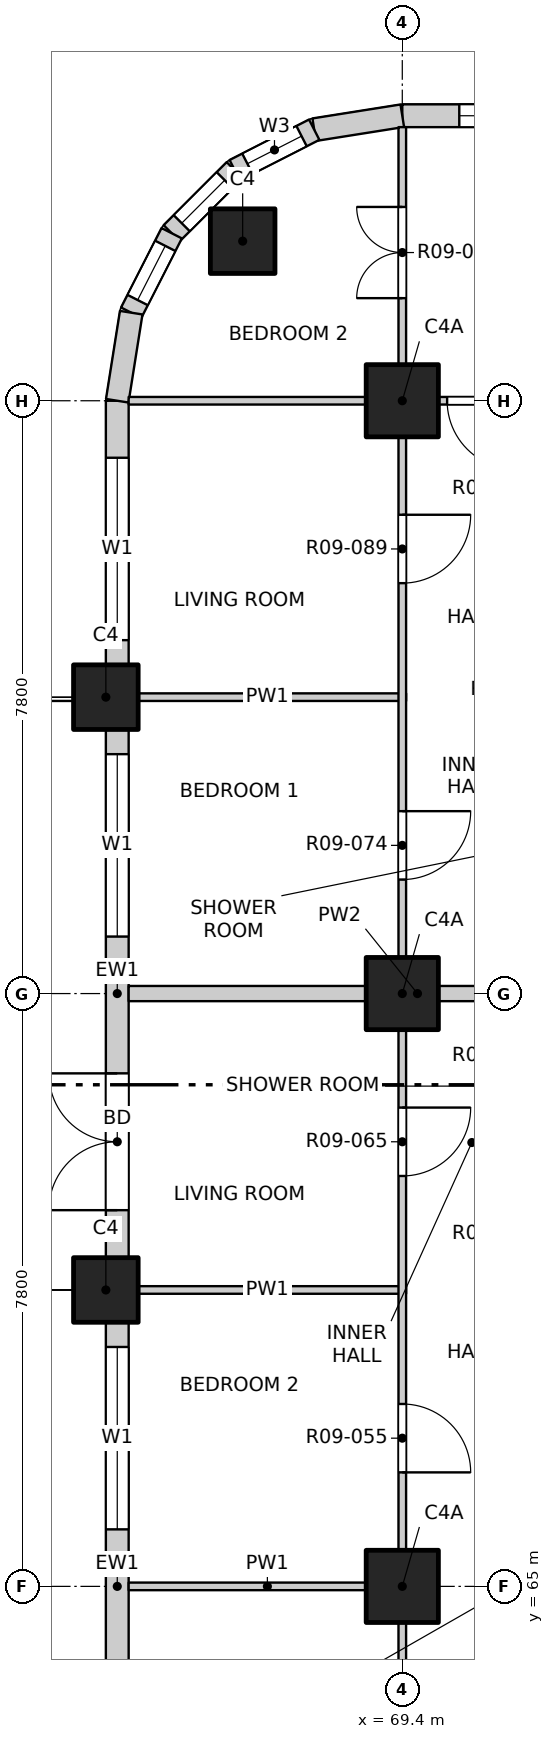
"""IFC4 building model, lengths in metres.
Left out: names, types, materials, properties, quantities, classifications, styles, units other than length and angle.
Written with IfcOpenShell. Run it as: python <this file> out.ifc"""

import sys

from ifc_helpers import new_model, si_unit, direction, frame, frame_2d, origin, origin_2d, place, context, subcontext, project, spatial, rectangle, extrude, element, fill, save


model = new_model("IFC4")
c1 = context("Model", 3, precision=1e-05, world=origin(), true_north=direction((0.0, 1.0)))
c2 = subcontext(c1, "Body", "Model", "MODEL_VIEW")
j1 = project(units=[si_unit("LENGTHUNIT", "METRE"), si_unit("PLANEANGLEUNIT", "RADIAN")], contexts=[c1])
p1 = place(None, origin())
s1 = spatial("IfcSite", under=j1, at=p1, CompositionType="ELEMENT")
p2 = place(p1, origin())
s2 = spatial("IfcBuilding", under=s1, at=p2, CompositionType="ELEMENT")
p3 = place(p2, frame((0.0, 0.0, 113.5)))
s3 = spatial("IfcBuildingStorey", under=s2, at=p3, CompositionType="ELEMENT", Elevation=113.5)
for number, where, z_axis, x_axis in (
    (1, (67.3, 82.7, -0.25), (0.0, 0.0, 1.0), (1.0, 0.0, 0.0)),
    (2, (65.5, 68.9, -0.25), (0.0, 0.0, 1.0), (1.0, 0.0, 0.0)),
    (3, (65.5, 76.7, -0.25), (0.0, 0.0, 1.0), (1.0, 0.0, 0.0)),
):
    element("IfcColumn", number, at=place(p3, frame(where, z_axis=z_axis, x_axis=x_axis)), inside=s3, PredefinedType="COLUMN", context=c2, shape_type="SweptSolid", body=[
        extrude(rectangle(XDim=0.85, YDim=0.85, at=origin_2d()), origin(), (0.0, 0.0, 1.0), 3.35),
    ])
for number, where, z_axis, x_axis in (
    (4, (69.4, 65.0, -0.25), (0.0, 0.0, 1.0), (1.0, 0.0, 0.0)),
    (5, (69.4, 72.8, -0.25), (0.0, 0.0, 1.0), (1.0, 0.0, 0.0)),
    (6, (69.4, 80.6, -0.25), (0.0, 0.0, 1.0), (1.0, 0.0, 0.0)),
):
    element("IfcColumn", number, at=place(p3, frame(where, z_axis=z_axis, x_axis=x_axis)), inside=s3, PredefinedType="COLUMN", context=c2, shape_type="SweptSolid", body=[
        extrude(rectangle(XDim=0.95, YDim=0.95, at=origin_2d()), origin(), (0.0, 0.0, 1.0), 3.35),
    ])
p4 = place(p3, frame((69.4, 84.35, 0.0), z_axis=(0.0, 0.0, 1.0), x_axis=(1.0, 0.0, 0.0)))
e7 = element("IfcWall", 7, at=p4, inside=s3, PredefinedType="SOLIDWALL", context=c2, shape_type="SweptSolid", body=[
    extrude(rectangle(XDim=3.475, YDim=0.3, at=frame_2d((1.738, 0.0))), origin(), (0.0, 0.0, 1.0), 3.1),
])
p5 = place(p4, frame((0.75, 0.0, 0.9)))
e8 = element("IfcOpeningElement", 8, at=p5, cuts=e7, PredefinedType="OPENING", context=c2, shape_type="SweptSolid", body=[
    extrude(rectangle(XDim=2.4, YDim=1.8, at=frame_2d((1.2, 0.9))), frame((0.0, 0.16, 0.0), z_axis=(0.0, -1.0, 0.0), x_axis=(1.0, 0.0, 0.0)), (0.0, 0.0, 1.0), 0.32),
])
p6 = place(p3, frame((65.65, 61.525, 0.0), z_axis=(0.0, 0.0, 1.0), x_axis=(0.0, 1.0, 0.0)))
e9 = element("IfcWall", 9, at=p6, inside=s3, PredefinedType="SOLIDWALL", context=c2, shape_type="SweptSolid", body=[
    extrude(rectangle(XDim=6.95, YDim=0.3, at=frame_2d((3.475, 0.0))), origin(), (0.0, 0.0, 1.0), 3.1),
])
p7 = place(p6, frame((0.625, 0.0, 0.0)))
e10 = element("IfcOpeningElement", 10, at=p7, cuts=e9, PredefinedType="OPENING", context=c2, shape_type="SweptSolid", body=[
    extrude(rectangle(XDim=1.8, YDim=2.4, at=frame_2d((0.9, 1.2))), frame((0.0, 0.16, 0.0), z_axis=(0.0, -1.0, 0.0), x_axis=(1.0, 0.0, 0.0)), (0.0, 0.0, 1.0), 0.32),
])
p8 = place(p6, frame((4.225, 0.0, 0.9)))
e11 = element("IfcOpeningElement", 11, at=p8, cuts=e9, PredefinedType="OPENING", context=c2, shape_type="SweptSolid", body=[
    extrude(rectangle(XDim=2.4, YDim=1.8, at=frame_2d((1.2, 0.9))), frame((0.0, 0.16, 0.0), z_axis=(0.0, -1.0, 0.0), x_axis=(1.0, 0.0, 0.0)), (0.0, 0.0, 1.0), 0.32),
])
p9 = place(p3, frame((65.65, 69.325, 0.0), z_axis=(0.0, 0.0, 1.0), x_axis=(0.0, 1.0, 0.0)))
e12 = element("IfcWall", 12, at=p9, inside=s3, PredefinedType="SOLIDWALL", context=c2, shape_type="SweptSolid", body=[
    extrude(rectangle(XDim=6.95, YDim=0.3, at=frame_2d((3.475, 0.0))), origin(), (0.0, 0.0, 1.0), 3.1),
])
p10 = place(p9, frame((0.625, 0.0, 0.0)))
e13 = element("IfcOpeningElement", 13, at=p10, cuts=e12, PredefinedType="OPENING", context=c2, shape_type="SweptSolid", body=[
    extrude(rectangle(XDim=1.8, YDim=2.4, at=frame_2d((0.9, 1.2))), frame((0.0, 0.16, 0.0), z_axis=(0.0, -1.0, 0.0), x_axis=(1.0, 0.0, 0.0)), (0.0, 0.0, 1.0), 0.32),
])
p11 = place(p9, frame((4.225, 0.0, 0.9)))
e14 = element("IfcOpeningElement", 14, at=p11, cuts=e12, PredefinedType="OPENING", context=c2, shape_type="SweptSolid", body=[
    extrude(rectangle(XDim=2.4, YDim=1.8, at=frame_2d((1.2, 0.9))), frame((0.0, 0.16, 0.0), z_axis=(0.0, -1.0, 0.0), x_axis=(1.0, 0.0, 0.0)), (0.0, 0.0, 1.0), 0.32),
])
p12 = place(p3, frame((65.65, 77.125, 0.0), z_axis=(0.0, 0.0, 1.0), x_axis=(0.0, 1.0, 0.0)))
e15 = element("IfcWall", 15, at=p12, inside=s3, PredefinedType="SOLIDWALL", context=c2, shape_type="SweptSolid", body=[
    extrude(rectangle(XDim=3.475, YDim=0.3, at=frame_2d((1.738, 0.0))), origin(), (0.0, 0.0, 1.0), 3.1),
])
p13 = place(p12, frame((0.325, 0.0, 0.9)))
e16 = element("IfcOpeningElement", 16, at=p13, cuts=e15, PredefinedType="OPENING", context=c2, shape_type="SweptSolid", body=[
    extrude(rectangle(XDim=2.4, YDim=1.8, at=frame_2d((1.2, 0.9))), frame((0.0, 0.16, 0.0), z_axis=(0.0, -1.0, 0.0), x_axis=(1.0, 0.0, 0.0)), (0.0, 0.0, 1.0), 0.32),
])
p14 = place(p3, frame((69.4, 84.35, 0.0), z_axis=(0.0, 0.0, 1.0), x_axis=(-0.987678452879, -0.156496880861, 0.0)))
e17 = element("IfcWall", 17, at=p14, inside=s3, PredefinedType="SOLIDWALL", context=c2, shape_type="SweptSolid", body=[
    extrude(rectangle(XDim=1.173, YDim=0.3, at=frame_2d((0.586, 0.0))), origin(), (0.0, 0.0, 1.0), 3.1),
])
p15 = place(p3, frame((68.241, 84.167, 0.0), z_axis=(0.0, 0.0, 1.0), x_axis=(-0.890988677504, -0.454025524128, 0.0)))
e18 = element("IfcWall", 18, at=p15, inside=s3, PredefinedType="SOLIDWALL", context=c2, shape_type="SweptSolid", body=[
    extrude(rectangle(XDim=1.173, YDim=0.3, at=frame_2d((0.587, 0.0))), origin(), (0.0, 0.0, 1.0), 3.1),
])
p16 = place(p15, frame((0.187, 0.0, 0.9)))
e19 = element("IfcOpeningElement", 19, at=p16, cuts=e18, PredefinedType="OPENING", context=c2, shape_type="SweptSolid", body=[
    extrude(rectangle(XDim=0.8, YDim=1.2, at=frame_2d((0.4, 0.6))), frame((0.0, 0.16, 0.0), z_axis=(0.0, -1.0, 0.0), x_axis=(1.0, 0.0, 0.0)), (0.0, 0.0, 1.0), 0.32),
])
p17 = place(p3, frame((67.196, 83.634, 0.0), z_axis=(0.0, 0.0, 1.0), x_axis=(-0.707106781187, -0.707106781187, 0.0)))
e20 = element("IfcWall", 20, at=p17, inside=s3, PredefinedType="SOLIDWALL", context=c2, shape_type="SweptSolid", body=[
    extrude(rectangle(XDim=1.173, YDim=0.3, at=frame_2d((0.586, 0.0))), origin(), (0.0, 0.0, 1.0), 3.1),
])
p18 = place(p17, frame((0.187, 0.0, 0.9)))
e21 = element("IfcOpeningElement", 21, at=p18, cuts=e20, PredefinedType="OPENING", context=c2, shape_type="SweptSolid", body=[
    extrude(rectangle(XDim=0.8, YDim=1.2, at=frame_2d((0.4, 0.6))), frame((0.0, 0.16, 0.0), z_axis=(0.0, -1.0, 0.0), x_axis=(1.0, 0.0, 0.0)), (0.0, 0.0, 1.0), 0.32),
])
p19 = place(p3, frame((66.366, 82.804, 0.0), z_axis=(0.0, 0.0, 1.0), x_axis=(-0.454025524128, -0.890988677504, 0.0)))
e22 = element("IfcWall", 22, at=p19, inside=s3, PredefinedType="SOLIDWALL", context=c2, shape_type="SweptSolid", body=[
    extrude(rectangle(XDim=1.173, YDim=0.3, at=frame_2d((0.587, 0.0))), origin(), (0.0, 0.0, 1.0), 3.1),
])
p20 = place(p19, frame((0.187, 0.0, 0.9)))
e23 = element("IfcOpeningElement", 23, at=p20, cuts=e22, PredefinedType="OPENING", context=c2, shape_type="SweptSolid", body=[
    extrude(rectangle(XDim=0.8, YDim=1.2, at=frame_2d((0.4, 0.6))), frame((0.0, 0.16, 0.0), z_axis=(0.0, -1.0, 0.0), x_axis=(1.0, 0.0, 0.0)), (0.0, 0.0, 1.0), 0.32),
])
p21 = place(p3, frame((65.833, 81.759, 0.0), z_axis=(0.0, 0.0, 1.0), x_axis=(-0.156496880861, -0.987678452879, 0.0)))
e24 = element("IfcWall", 24, at=p21, inside=s3, PredefinedType="SOLIDWALL", context=c2, shape_type="SweptSolid", body=[
    extrude(rectangle(XDim=1.173, YDim=0.3, at=frame_2d((0.586, 0.0))), origin(), (0.0, 0.0, 1.0), 3.1),
])
for number, where, z_axis, x_axis in (
    (25, (65.8, 65.0, 0.0), (0.0, 0.0, 1.0), (1.0, 0.0, 0.0)),
    (26, (65.8, 68.9, 0.0), (0.0, 0.0, 1.0), (1.0, 0.0, 0.0)),
):
    element("IfcWall", number, at=place(p3, frame(where, z_axis=z_axis, x_axis=x_axis)), inside=s3, PredefinedType="PARTITIONING", context=c2, shape_type="SweptSolid", body=[
        extrude(rectangle(XDim=3.65, YDim=0.1, at=frame_2d((1.825, 0.0))), origin(), (0.0, 0.0, 1.0), 3.1),
    ])
p22 = place(p3, frame((65.8, 72.8, 0.0), z_axis=(0.0, 0.0, 1.0), x_axis=(1.0, 0.0, 0.0)))
e27 = element("IfcWall", 27, at=p22, inside=s3, PredefinedType="PARTITIONING", context=c2, shape_type="SweptSolid", body=[
    extrude(rectangle(XDim=7.6, YDim=0.2, at=frame_2d((3.8, 0.0))), origin(), (0.0, 0.0, 1.0), 3.1),
])
p23 = place(p3, frame((65.8, 76.7, 0.0), z_axis=(0.0, 0.0, 1.0), x_axis=(1.0, 0.0, 0.0)))
e28 = element("IfcWall", 28, at=p23, inside=s3, PredefinedType="PARTITIONING", context=c2, shape_type="SweptSolid", body=[
    extrude(rectangle(XDim=3.65, YDim=0.1, at=frame_2d((1.825, 0.0))), origin(), (0.0, 0.0, 1.0), 3.1),
])
p24 = place(p3, frame((65.8, 80.6, 0.0), z_axis=(0.0, 0.0, 1.0), x_axis=(1.0, 0.0, 0.0)))
e29 = element("IfcWall", 29, at=p24, inside=s3, PredefinedType="PARTITIONING", context=c2, shape_type="SweptSolid", body=[
    extrude(rectangle(XDim=7.6, YDim=0.1, at=frame_2d((3.8, 0.0))), origin(), (0.0, 0.0, 1.0), 3.1),
])
p25 = place(p24, frame((4.19, 0.0, 0.0)))
e30 = element("IfcOpeningElement", 30, at=p25, cuts=e29, PredefinedType="OPENING", context=c2, shape_type="SweptSolid", body=[
    extrude(rectangle(XDim=0.9, YDim=2.1, at=frame_2d((0.45, 1.05))), frame((0.0, 0.06, 0.0), z_axis=(0.0, -1.0, 0.0), x_axis=(1.0, 0.0, 0.0)), (0.0, 0.0, 1.0), 0.12),
])
p26 = place(p3, frame((69.4, 45.8, 0.0), z_axis=(0.0, 0.0, 1.0), x_axis=(0.0, 1.0, 0.0)))
e31 = element("IfcWall", 31, at=p26, inside=s3, PredefinedType="PARTITIONING", context=c2, shape_type="SweptSolid", body=[
    extrude(rectangle(XDim=38.4, YDim=0.1, at=frame_2d((19.2, 0.0))), origin(), (0.0, 0.0, 1.0), 3.1),
])
p27 = place(p26, frame((1.05, 0.0, 0.0)))
e32 = element("IfcOpeningElement", 32, at=p27, cuts=e31, PredefinedType="OPENING", context=c2, shape_type="SweptSolid", body=[
    extrude(rectangle(XDim=1.2, YDim=2.1, at=frame_2d((0.6, 1.05))), frame((0.0, 0.06, 0.0), z_axis=(0.0, -1.0, 0.0), x_axis=(1.0, 0.0, 0.0)), (0.0, 0.0, 1.0), 0.12),
])
p28 = place(p26, frame((5.1, 0.0, 0.0)))
e33 = element("IfcOpeningElement", 33, at=p28, cuts=e31, PredefinedType="OPENING", context=c2, shape_type="SweptSolid", body=[
    extrude(rectangle(XDim=0.9, YDim=2.1, at=frame_2d((0.45, 1.05))), frame((0.0, 0.06, 0.0), z_axis=(0.0, -1.0, 0.0), x_axis=(1.0, 0.0, 0.0)), (0.0, 0.0, 1.0), 0.12),
])
p29 = place(p26, frame((9.0, 0.0, 0.0)))
e34 = element("IfcOpeningElement", 34, at=p29, cuts=e31, PredefinedType="OPENING", context=c2, shape_type="SweptSolid", body=[
    extrude(rectangle(XDim=0.9, YDim=2.1, at=frame_2d((0.45, 1.05))), frame((0.0, 0.06, 0.0), z_axis=(0.0, -1.0, 0.0), x_axis=(1.0, 0.0, 0.0)), (0.0, 0.0, 1.0), 0.12),
])
p30 = place(p26, frame((12.9, 0.0, 0.0)))
e35 = element("IfcOpeningElement", 35, at=p30, cuts=e31, PredefinedType="OPENING", context=c2, shape_type="SweptSolid", body=[
    extrude(rectangle(XDim=0.9, YDim=2.1, at=frame_2d((0.45, 1.05))), frame((0.0, 0.06, 0.0), z_axis=(0.0, -1.0, 0.0), x_axis=(1.0, 0.0, 0.0)), (0.0, 0.0, 1.0), 0.12),
])
p31 = place(p26, frame((16.8, 0.0, 0.0)))
e36 = element("IfcOpeningElement", 36, at=p31, cuts=e31, PredefinedType="OPENING", context=c2, shape_type="SweptSolid", body=[
    extrude(rectangle(XDim=0.9, YDim=2.1, at=frame_2d((0.45, 1.05))), frame((0.0, 0.06, 0.0), z_axis=(0.0, -1.0, 0.0), x_axis=(1.0, 0.0, 0.0)), (0.0, 0.0, 1.0), 0.12),
])
p32 = place(p26, frame((20.7, 0.0, 0.0)))
e37 = element("IfcOpeningElement", 37, at=p32, cuts=e31, PredefinedType="OPENING", context=c2, shape_type="SweptSolid", body=[
    extrude(rectangle(XDim=0.9, YDim=2.1, at=frame_2d((0.45, 1.05))), frame((0.0, 0.06, 0.0), z_axis=(0.0, -1.0, 0.0), x_axis=(1.0, 0.0, 0.0)), (0.0, 0.0, 1.0), 0.12),
])
p33 = place(p26, frame((24.6, 0.0, 0.0)))
e38 = element("IfcOpeningElement", 38, at=p33, cuts=e31, PredefinedType="OPENING", context=c2, shape_type="SweptSolid", body=[
    extrude(rectangle(XDim=0.9, YDim=2.1, at=frame_2d((0.45, 1.05))), frame((0.0, 0.06, 0.0), z_axis=(0.0, -1.0, 0.0), x_axis=(1.0, 0.0, 0.0)), (0.0, 0.0, 1.0), 0.12),
])
p34 = place(p26, frame((28.5, 0.0, 0.0)))
e39 = element("IfcOpeningElement", 39, at=p34, cuts=e31, PredefinedType="OPENING", context=c2, shape_type="SweptSolid", body=[
    extrude(rectangle(XDim=0.9, YDim=2.1, at=frame_2d((0.45, 1.05))), frame((0.0, 0.06, 0.0), z_axis=(0.0, -1.0, 0.0), x_axis=(1.0, 0.0, 0.0)), (0.0, 0.0, 1.0), 0.12),
])
p35 = place(p26, frame((32.4, 0.0, 0.0)))
e40 = element("IfcOpeningElement", 40, at=p35, cuts=e31, PredefinedType="OPENING", context=c2, shape_type="SweptSolid", body=[
    extrude(rectangle(XDim=0.9, YDim=2.1, at=frame_2d((0.45, 1.05))), frame((0.0, 0.06, 0.0), z_axis=(0.0, -1.0, 0.0), x_axis=(1.0, 0.0, 0.0)), (0.0, 0.0, 1.0), 0.12),
])
p36 = place(p26, frame((36.15, 0.0, 0.0)))
e41 = element("IfcOpeningElement", 41, at=p36, cuts=e31, PredefinedType="OPENING", context=c2, shape_type="SweptSolid", body=[
    extrude(rectangle(XDim=1.2, YDim=2.1, at=frame_2d((0.6, 1.05))), frame((0.0, 0.06, 0.0), z_axis=(0.0, -1.0, 0.0), x_axis=(1.0, 0.0, 0.0)), (0.0, 0.0, 1.0), 0.12),
])
p37 = place(p5, origin())
e42 = element("IfcWindow", 42, at=p37, inside=s3, PartitioningType="DOUBLE_PANEL_VERTICAL", PredefinedType="WINDOW", context=c2, shape_type="SweptSolid", body=[
    extrude(rectangle(XDim=2.4, YDim=1.8, at=frame_2d((1.2, 0.9))), frame((0.0, 0.03, 0.0), z_axis=(0.0, -1.0, 0.0), x_axis=(1.0, 0.0, 0.0)), (0.0, 0.0, 1.0), 0.06),
])
fill(e8, e42)
p38 = place(p8, origin())
e43 = element("IfcWindow", 43, at=p38, inside=s3, PartitioningType="DOUBLE_PANEL_VERTICAL", PredefinedType="WINDOW", context=c2, shape_type="SweptSolid", body=[
    extrude(rectangle(XDim=2.4, YDim=1.8, at=frame_2d((1.2, 0.9))), frame((0.0, 0.03, 0.0), z_axis=(0.0, -1.0, 0.0), x_axis=(1.0, 0.0, 0.0)), (0.0, 0.0, 1.0), 0.06),
])
fill(e11, e43)
p39 = place(p10, origin())
e44 = element("IfcDoor", 44, at=p39, inside=s3, OperationType="DOUBLE_DOOR_SINGLE_SWING", PredefinedType="DOOR", context=c2, shape_type="SweptSolid", body=[
    extrude(rectangle(XDim=1.8, YDim=2.4, at=frame_2d((0.9, 1.2))), frame((0.0, 0.025, 0.0), z_axis=(0.0, -1.0, 0.0), x_axis=(1.0, 0.0, 0.0)), (0.0, 0.0, 1.0), 0.05),
])
fill(e13, e44)
p40 = place(p11, origin())
e45 = element("IfcWindow", 45, at=p40, inside=s3, PartitioningType="DOUBLE_PANEL_VERTICAL", PredefinedType="WINDOW", context=c2, shape_type="SweptSolid", body=[
    extrude(rectangle(XDim=2.4, YDim=1.8, at=frame_2d((1.2, 0.9))), frame((0.0, 0.03, 0.0), z_axis=(0.0, -1.0, 0.0), x_axis=(1.0, 0.0, 0.0)), (0.0, 0.0, 1.0), 0.06),
])
fill(e14, e45)
p41 = place(p13, origin())
e46 = element("IfcWindow", 46, at=p41, inside=s3, PartitioningType="DOUBLE_PANEL_VERTICAL", PredefinedType="WINDOW", context=c2, shape_type="SweptSolid", body=[
    extrude(rectangle(XDim=2.4, YDim=1.8, at=frame_2d((1.2, 0.9))), frame((0.0, 0.03, 0.0), z_axis=(0.0, -1.0, 0.0), x_axis=(1.0, 0.0, 0.0)), (0.0, 0.0, 1.0), 0.06),
])
fill(e16, e46)
p42 = place(p16, origin())
e47 = element("IfcWindow", 47, at=p42, inside=s3, PartitioningType="SINGLE_PANEL", PredefinedType="WINDOW", context=c2, shape_type="SweptSolid", body=[
    extrude(rectangle(XDim=0.8, YDim=1.2, at=frame_2d((0.4, 0.6))), frame((0.0, 0.03, 0.0), z_axis=(0.0, -1.0, 0.0), x_axis=(1.0, 0.0, 0.0)), (0.0, 0.0, 1.0), 0.06),
])
fill(e19, e47)
p43 = place(p18, origin())
e48 = element("IfcWindow", 48, at=p43, inside=s3, PartitioningType="SINGLE_PANEL", PredefinedType="WINDOW", context=c2, shape_type="SweptSolid", body=[
    extrude(rectangle(XDim=0.8, YDim=1.2, at=frame_2d((0.4, 0.6))), frame((0.0, 0.03, 0.0), z_axis=(0.0, -1.0, 0.0), x_axis=(1.0, 0.0, 0.0)), (0.0, 0.0, 1.0), 0.06),
])
fill(e21, e48)
p44 = place(p20, origin())
e49 = element("IfcWindow", 49, at=p44, inside=s3, PartitioningType="SINGLE_PANEL", PredefinedType="WINDOW", context=c2, shape_type="SweptSolid", body=[
    extrude(rectangle(XDim=0.8, YDim=1.2, at=frame_2d((0.4, 0.6))), frame((0.0, 0.03, 0.0), z_axis=(0.0, -1.0, 0.0), x_axis=(1.0, 0.0, 0.0)), (0.0, 0.0, 1.0), 0.06),
])
fill(e23, e49)
p45 = place(p32, origin())
e50 = element("IfcDoor", 50, at=p45, inside=s3, OperationType="SINGLE_SWING_RIGHT", PredefinedType="DOOR", context=c2, shape_type="SweptSolid", body=[
    extrude(rectangle(XDim=0.9, YDim=2.1, at=frame_2d((0.45, 1.05))), frame((0.0, 0.025, 0.0), z_axis=(0.0, -1.0, 0.0), x_axis=(1.0, 0.0, 0.0)), (0.0, 0.0, 1.0), 0.05),
])
fill(e37, e50)
p46 = place(p33, origin())
e51 = element("IfcDoor", 51, at=p46, inside=s3, OperationType="SINGLE_SWING_LEFT", PredefinedType="DOOR", context=c2, shape_type="SweptSolid", body=[
    extrude(rectangle(XDim=0.9, YDim=2.1, at=frame_2d((0.45, 1.05))), frame((0.0, 0.025, 0.0), z_axis=(0.0, -1.0, 0.0), x_axis=(1.0, 0.0, 0.0)), (0.0, 0.0, 1.0), 0.05),
])
fill(e38, e51)
p47 = place(p34, origin())
e52 = element("IfcDoor", 52, at=p47, inside=s3, OperationType="SINGLE_SWING_LEFT", PredefinedType="DOOR", context=c2, shape_type="SweptSolid", body=[
    extrude(rectangle(XDim=0.9, YDim=2.1, at=frame_2d((0.45, 1.05))), frame((0.0, 0.025, 0.0), z_axis=(0.0, -1.0, 0.0), x_axis=(1.0, 0.0, 0.0)), (0.0, 0.0, 1.0), 0.05),
])
fill(e39, e52)
p48 = place(p35, origin())
e53 = element("IfcDoor", 53, at=p48, inside=s3, OperationType="SINGLE_SWING_LEFT", PredefinedType="DOOR", context=c2, shape_type="SweptSolid", body=[
    extrude(rectangle(XDim=0.9, YDim=2.1, at=frame_2d((0.45, 1.05))), frame((0.0, 0.025, 0.0), z_axis=(0.0, -1.0, 0.0), x_axis=(1.0, 0.0, 0.0)), (0.0, 0.0, 1.0), 0.05),
])
fill(e40, e53)
p49 = place(p25, origin())
e54 = element("IfcDoor", 54, at=p49, inside=s3, OperationType="SINGLE_SWING_LEFT", PredefinedType="DOOR", context=c2, shape_type="SweptSolid", body=[
    extrude(rectangle(XDim=0.9, YDim=2.1, at=frame_2d((0.45, 1.05))), frame((0.0, 0.025, 0.0), z_axis=(0.0, -1.0, 0.0), x_axis=(1.0, 0.0, 0.0)), (0.0, 0.0, 1.0), 0.05),
])
fill(e30, e54)
p50 = place(p36, origin())
e55 = element("IfcDoor", 55, at=p50, inside=s3, OperationType="DOUBLE_DOOR_SINGLE_SWING", PredefinedType="DOOR", context=c2, shape_type="SweptSolid", body=[
    extrude(rectangle(XDim=1.2, YDim=2.1, at=frame_2d((0.6, 1.05))), frame((0.0, 0.025, 0.0), z_axis=(0.0, -1.0, 0.0), x_axis=(1.0, 0.0, 0.0)), (0.0, 0.0, 1.0), 0.05),
])
fill(e41, e55)
save(model, sys.argv[1])
